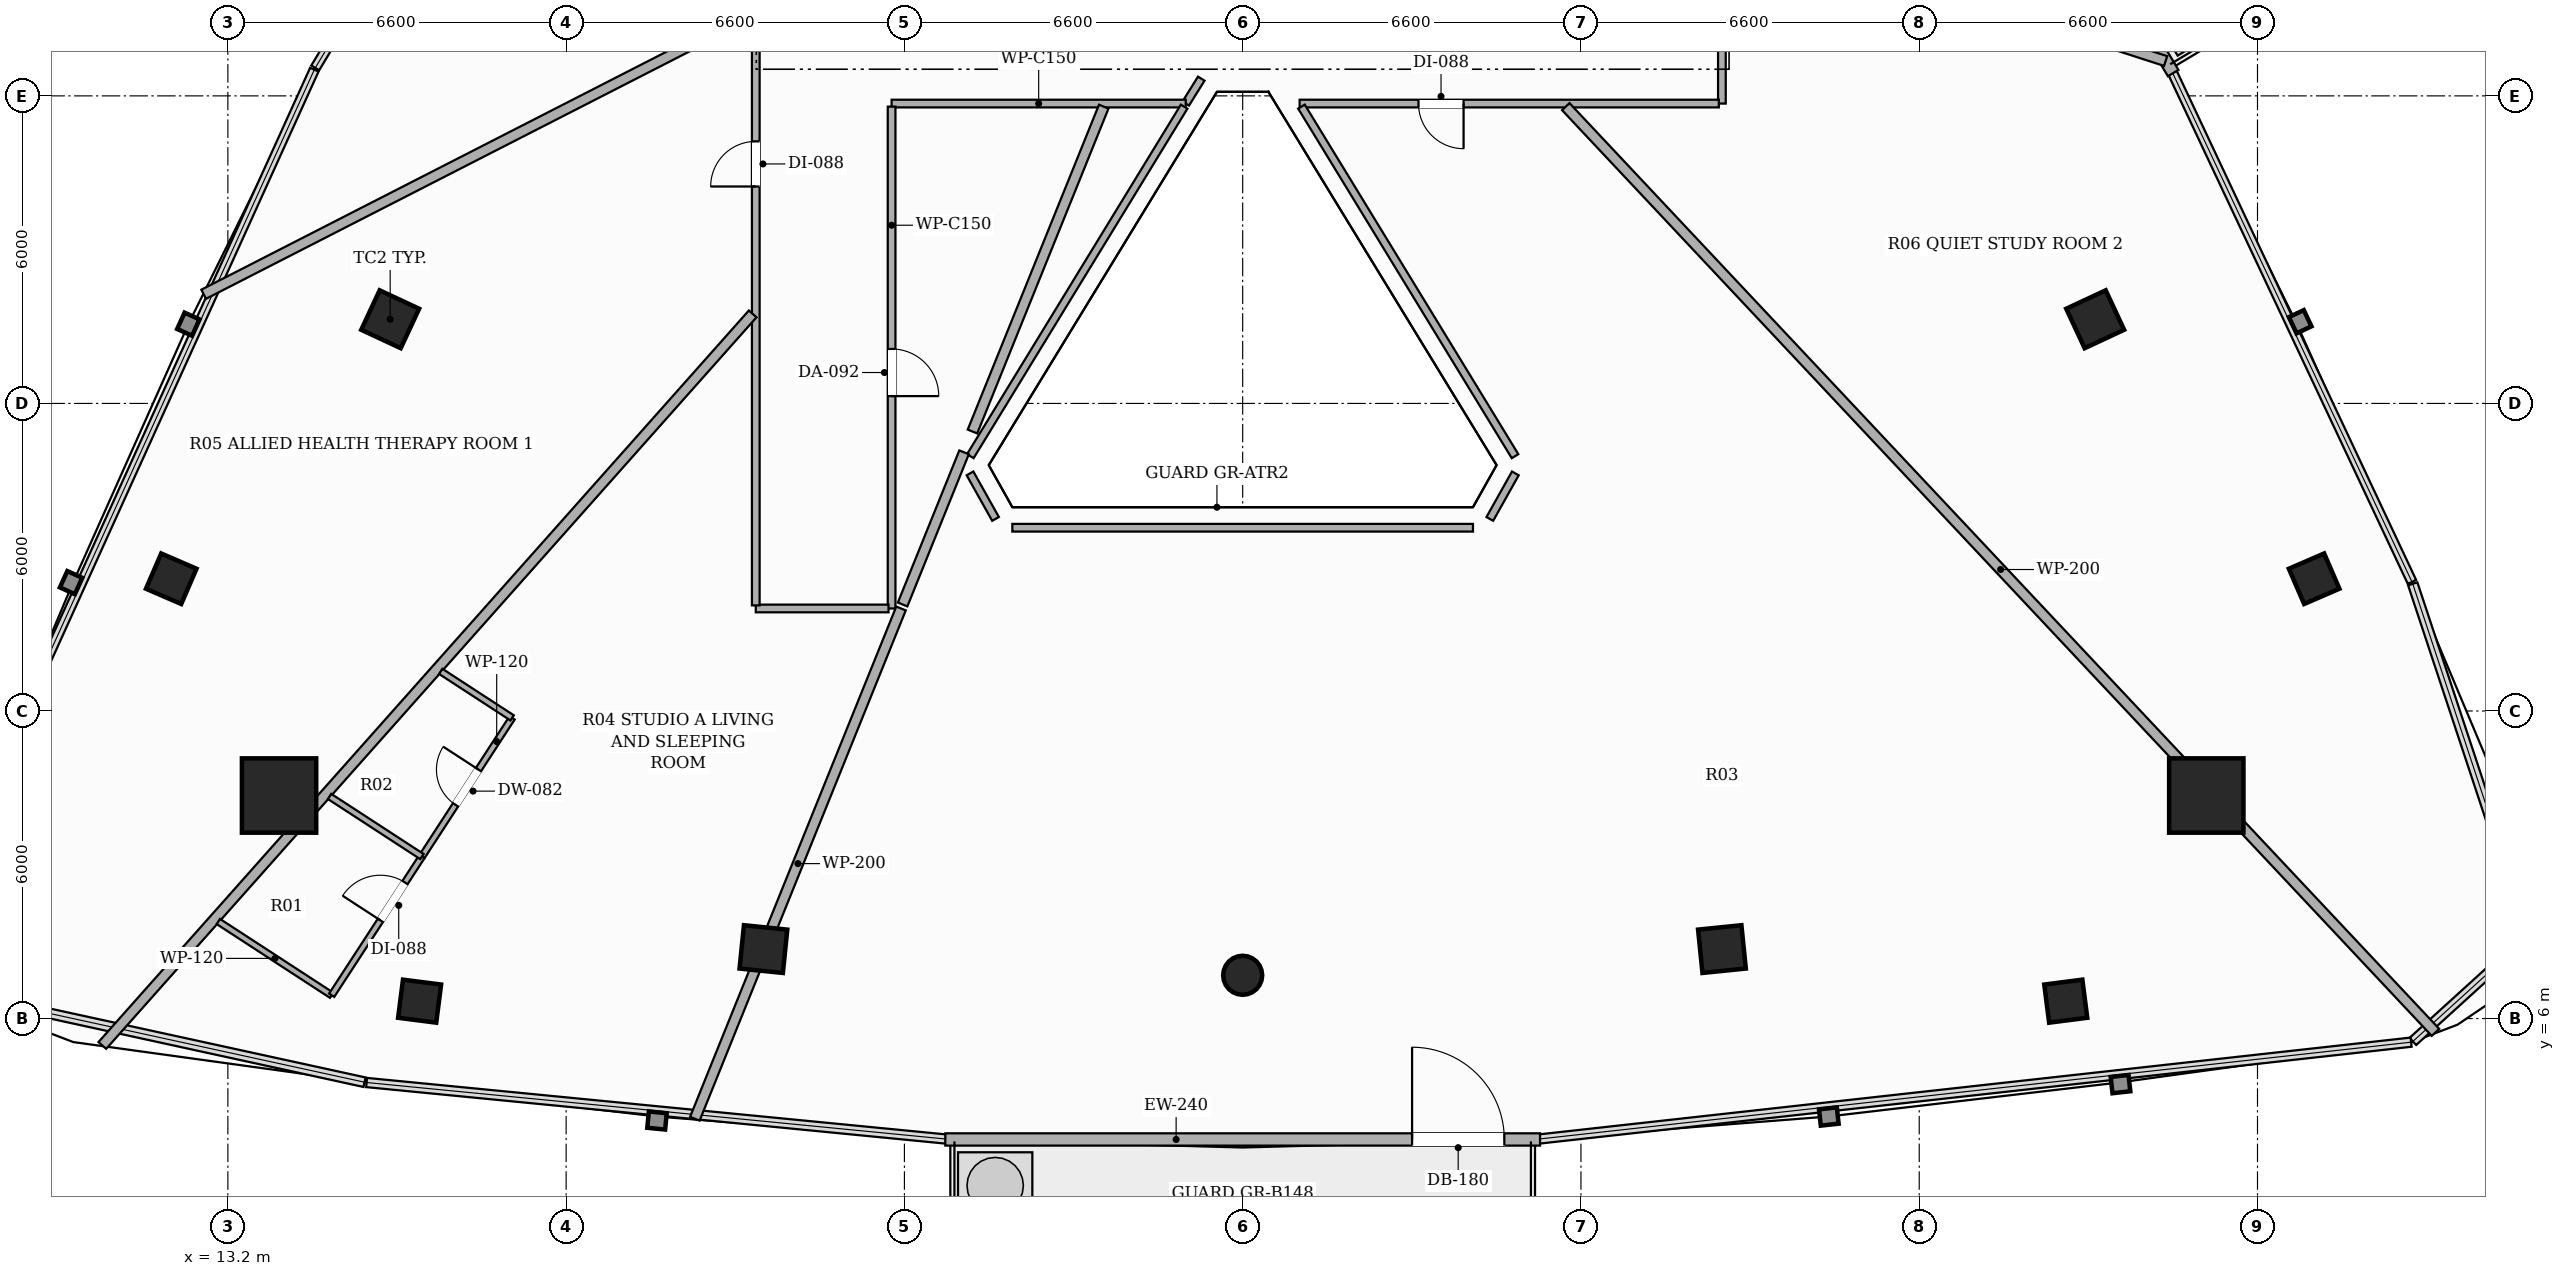
"""IFC4 building model, lengths in metres.
Left out: names, types, materials, properties, quantities, classifications, styles, units other than length and angle.
Written with IfcOpenShell. Run it as: python <this file> out.ifc"""

import sys

from ifc_helpers import new_model, si_unit, direction, frame, frame_2d, origin, origin_2d, place, context, subcontext, project, spatial, rectangle, hollow_rectangle, hollow_circle, extrude, element, fill, save


model = new_model("IFC4")
c1 = context("Model", 3, precision=1e-05, world=origin(), true_north=direction((0.0, 1.0)))
c2 = subcontext(c1, "Body", "Model", "MODEL_VIEW")
j1 = project(units=[si_unit("LENGTHUNIT", "METRE"), si_unit("PLANEANGLEUNIT", "RADIAN")], contexts=[c1])
p1 = place(None, origin())
s1 = spatial("IfcSite", under=j1, at=p1, CompositionType="ELEMENT")
p2 = place(p1, origin())
s2 = spatial("IfcBuilding", under=s1, at=p2, CompositionType="ELEMENT")
p3 = place(p2, frame((0.0, 0.0, 157.25)))
s3 = spatial("IfcBuildingStorey", under=s2, at=p3, CompositionType="ELEMENT", Elevation=157.25)
for number, where, z_axis, x_axis in (
    (1, (14.199, 10.351, 0.0), (0.0, 0.0, 1.0), (1.0, 0.0, 0.0)),
    (2, (51.801, 10.351, 0.0), (0.0, 0.0, 1.0), (1.0, 0.0, 0.0)),
):
    element("IfcColumn", number, at=place(p3, frame(where, z_axis=z_axis, x_axis=x_axis)), inside=s3, PredefinedType="COLUMN", context=c2, shape_type="SweptSolid", body=[
        extrude(hollow_rectangle(XDim=1.45, YDim=1.45, WallThickness=0.045, at=origin_2d()), origin(), (0.0, 0.0, 1.0), 3.3),
    ])
for number, where, z_axis, x_axis in (
    (3, (16.367, 19.642, 0.0), (0.0, 0.0, 1.0), (0.423, 0.906, 0.0)),
    (4, (23.649, 7.355, 0.0), (0.0, 0.0, 1.0), (-0.995, 0.101, 0.0)),
):
    element("IfcColumn", number, at=place(p3, frame(where, z_axis=z_axis, x_axis=x_axis)), inside=s3, PredefinedType="COLUMN", context=c2, shape_type="SweptSolid", body=[
        extrude(hollow_rectangle(XDim=0.85, YDim=0.85, WallThickness=0.028, at=origin_2d()), origin(), (0.0, 0.0, 1.0), 3.3),
    ])
p4 = place(p3, frame((33.0, 6.844, 0.0), z_axis=(0.0, 0.0, 1.0), x_axis=(1.0, 0.0, 0.0)))
e5 = element("IfcColumn", 5, at=p4, inside=s3, PredefinedType="COLUMN", context=c2, shape_type="SweptSolid", body=[
    extrude(hollow_circle(Radius=0.381, WallThickness=0.022, at=origin_2d()), origin(), (0.0, 0.0, 1.0), 3.3),
])
for number, where, z_axis, x_axis in (
    (6, (42.351, 7.355, 0.0), (0.0, 0.0, 1.0), (0.995, 0.101, 0.0)),
    (7, (49.633, 19.642, 0.0), (0.0, 0.0, 1.0), (-0.423, 0.906, 0.0)),
):
    element("IfcColumn", number, at=place(p3, frame(where, z_axis=z_axis, x_axis=x_axis)), inside=s3, PredefinedType="COLUMN", context=c2, shape_type="SweptSolid", body=[
        extrude(hollow_rectangle(XDim=0.85, YDim=0.85, WallThickness=0.028, at=origin_2d()), origin(), (0.0, 0.0, 1.0), 3.3),
    ])
for number, where, z_axis, x_axis in (
    (8, (12.095, 14.58, 0.0), (0.0, 0.0, 1.0), (0.397, 0.918, 0.0)),
    (9, (16.941, 6.339, 0.0), (0.0, 0.0, 1.0), (-0.992, 0.127, 0.0)),
    (10, (49.059, 6.339, 0.0), (0.0, 0.0, 1.0), (0.992, 0.127, 0.0)),
    (11, (53.905, 14.58, 0.0), (0.0, 0.0, 1.0), (-0.397, 0.918, 0.0)),
):
    element("IfcColumn", number, at=place(p3, frame(where, z_axis=z_axis, x_axis=x_axis)), inside=s3, PredefinedType="COLUMN", context=c2, shape_type="SweptSolid", body=[
        extrude(hollow_rectangle(XDim=0.75, YDim=0.75, WallThickness=0.025, at=origin_2d()), origin(), (0.0, 0.0, 1.0), 3.3),
    ])
p5 = place(p3, frame((27.198, 3.641, 0.0), z_axis=(0.0, 0.0, 1.0), x_axis=(1.0, 0.0, 0.0)))
e12 = element("IfcWall", 12, at=p5, inside=s3, PredefinedType="SOLIDWALL", context=c2, shape_type="SweptSolid", body=[
    extrude(rectangle(XDim=11.604, YDim=0.24, at=frame_2d((5.802, 0.0))), origin(), (0.0, 0.0, 1.0), 2.624),
])
p6 = place(p5, frame((9.107, 0.0, 0.0)))
e13 = element("IfcOpeningElement", 13, at=p6, cuts=e12, PredefinedType="OPENING", context=c2, shape_type="SweptSolid", body=[
    extrude(rectangle(XDim=1.8, YDim=2.2, at=frame_2d((0.9, 1.1))), frame((0.0, 0.13, 0.0), z_axis=(0.0, -1.0, 0.0), x_axis=(1.0, 0.0, 0.0)), (0.0, 0.0, 1.0), 0.26),
])
p7 = place(p3, frame((51.155, 24.445, 0.0), z_axis=(0.0, 0.0, 1.0), x_axis=(-0.514335781973, 0.857588889493, 0.0)))
e14 = element("IfcWall", 14, at=p7, inside=s3, PredefinedType="SOLIDWALL", context=c2, shape_type="SweptSolid", body=[
    extrude(rectangle(XDim=11.222, YDim=0.24, at=frame_2d((5.611, 0.0))), origin(), (0.0, 0.0, 1.0), 2.624),
])
p8 = place(p7, frame((8.725, 0.0, 0.0)))
e15 = element("IfcOpeningElement", 15, at=p8, cuts=e14, PredefinedType="OPENING", context=c2, shape_type="SweptSolid", body=[
    extrude(rectangle(XDim=1.8, YDim=2.2, at=frame_2d((0.9, 1.1))), frame((0.0, 0.13, 0.0), z_axis=(0.0, -1.0, 0.0), x_axis=(1.0, 0.0, 0.0)), (0.0, 0.0, 1.0), 0.26),
])
p9 = place(p3, frame((32.192, 24.336, 0.0), z_axis=(0.0, 0.0, 1.0), x_axis=(-0.529155471054, -0.848524889119, 0.0)))
e16 = element("IfcWall", 16, at=p9, inside=s3, PredefinedType="PARTITIONING", context=c2, shape_type="SweptSolid", body=[
    extrude(rectangle(XDim=0.573, YDim=0.15, at=frame_2d((0.286, 0.0))), origin(), (0.0, 0.0, 1.0), 3.06),
])
p10 = place(p3, frame((31.889, 23.85, 0.0), z_axis=(0.0, 0.0, 1.0), x_axis=(-1.0, 0.0, 0.0)))
e17 = element("IfcWall", 17, at=p10, inside=s3, PredefinedType="PARTITIONING", context=c2, shape_type="SweptSolid", body=[
    extrude(rectangle(XDim=5.739, YDim=0.15, at=frame_2d((2.87, 0.0))), origin(), (0.0, 0.0, 1.0), 2.721),
])
p11 = place(p3, frame((26.15, 23.79, 0.0), z_axis=(0.0, 0.0, 1.0), x_axis=(0.0, -1.0, 0.0)))
e18 = element("IfcWall", 18, at=p11, inside=s3, PredefinedType="PARTITIONING", context=c2, shape_type="SweptSolid", body=[
    extrude(rectangle(XDim=9.79, YDim=0.15, at=frame_2d((4.895, 0.0))), origin(), (0.0, 0.0, 1.0), 2.721),
])
p12 = place(p11, frame((4.727, 0.0, 0.0)))
e19 = element("IfcOpeningElement", 19, at=p12, cuts=e18, PredefinedType="OPENING", context=c2, shape_type="SweptSolid", body=[
    extrude(rectangle(XDim=0.92, YDim=2.15, at=frame_2d((0.46, 1.075))), frame((0.0, 0.085, 0.0), z_axis=(0.0, -1.0, 0.0), x_axis=(1.0, 0.0, 0.0)), (0.0, 0.0, 1.0), 0.17),
])
p13 = place(p3, frame((26.09, 14.0, 0.0), z_axis=(0.0, 0.0, 1.0), x_axis=(-1.0, 0.0, 0.0)))
e20 = element("IfcWall", 20, at=p13, inside=s3, PredefinedType="PARTITIONING", context=c2, shape_type="SweptSolid", body=[
    extrude(rectangle(XDim=2.59, YDim=0.15, at=frame_2d((1.295, 0.0))), origin(), (0.0, 0.0, 1.0), 2.721),
])
p14 = place(p3, frame((23.5, 14.06, 0.0), z_axis=(0.0, 0.0, 1.0), x_axis=(0.0, 1.0, 0.0)))
e21 = element("IfcWall", 21, at=p14, inside=s3, PredefinedType="PARTITIONING", context=c2, shape_type="SweptSolid", body=[
    extrude(rectangle(XDim=22.84, YDim=0.15, at=frame_2d((11.42, 0.0))), origin(), (0.0, 0.0, 1.0), 2.413),
])
p15 = place(p14, frame((8.172, 0.0, 0.0)))
e22 = element("IfcOpeningElement", 22, at=p15, cuts=e21, PredefinedType="OPENING", context=c2, shape_type="SweptSolid", body=[
    extrude(rectangle(XDim=0.88, YDim=2.1, at=frame_2d((0.44, 1.05))), frame((0.0, 0.085, 0.0), z_axis=(0.0, -1.0, 0.0), x_axis=(1.0, 0.0, 0.0)), (0.0, 0.0, 1.0), 0.17),
])
p16 = place(p14, frame((20.969, 0.0, 0.0)))
e23 = element("IfcOpeningElement", 23, at=p16, cuts=e21, PredefinedType="OPENING", context=c2, shape_type="SweptSolid", body=[
    extrude(rectangle(XDim=0.88, YDim=2.1, at=frame_2d((0.44, 1.05))), frame((0.0, 0.085, 0.0), z_axis=(0.0, -1.0, 0.0), x_axis=(1.0, 0.0, 0.0)), (0.0, 0.0, 1.0), 0.17),
])
p17 = place(p14, frame((15.484, 0.0, 0.0)))
e24 = element("IfcOpeningElement", 24, at=p17, cuts=e21, PredefinedType="OPENING", context=c2, shape_type="SweptSolid", body=[
    extrude(rectangle(XDim=0.88, YDim=2.1, at=frame_2d((0.44, 1.05))), frame((0.0, 0.085, 0.0), z_axis=(0.0, -1.0, 0.0), x_axis=(1.0, 0.0, 0.0)), (0.0, 0.0, 1.0), 0.17),
])
p18 = place(p3, frame((42.35, 28.34, 0.0), z_axis=(0.0, 0.0, 1.0), x_axis=(0.0, -1.0, 0.0)))
e25 = element("IfcWall", 25, at=p18, inside=s3, PredefinedType="PARTITIONING", context=c2, shape_type="SweptSolid", body=[
    extrude(rectangle(XDim=4.49, YDim=0.15, at=frame_2d((2.245, 0.0))), origin(), (0.0, 0.0, 1.0), 2.721),
])
p19 = place(p18, frame((2.086, 0.0, 0.0)))
e26 = element("IfcOpeningElement", 26, at=p19, cuts=e25, PredefinedType="OPENING", context=c2, shape_type="SweptSolid", body=[
    extrude(rectangle(XDim=0.88, YDim=2.1, at=frame_2d((0.44, 1.05))), frame((0.0, 0.085, 0.0), z_axis=(0.0, -1.0, 0.0), x_axis=(1.0, 0.0, 0.0)), (0.0, 0.0, 1.0), 0.17),
])
p20 = place(p3, frame((42.29, 23.85, 0.0), z_axis=(0.0, 0.0, 1.0), x_axis=(-1.0, 0.0, 0.0)))
e27 = element("IfcWall", 27, at=p20, inside=s3, PredefinedType="PARTITIONING", context=c2, shape_type="SweptSolid", body=[
    extrude(rectangle(XDim=8.179, YDim=0.15, at=frame_2d((4.089, 0.0))), origin(), (0.0, 0.0, 1.0), 2.492),
])
p21 = place(p20, frame((4.98, 0.0, 0.0)))
e28 = element("IfcOpeningElement", 28, at=p21, cuts=e27, PredefinedType="OPENING", context=c2, shape_type="SweptSolid", body=[
    extrude(rectangle(XDim=0.88, YDim=2.1, at=frame_2d((0.44, 1.05))), frame((0.0, 0.085, 0.0), z_axis=(0.0, -1.0, 0.0), x_axis=(1.0, 0.0, 0.0)), (0.0, 0.0, 1.0), 0.17),
])
p22 = place(p3, frame((34.147, 23.79, 0.0), z_axis=(0.0, 0.0, 1.0), x_axis=(0.521429001816, -0.853294671298, 0.0)))
e29 = element("IfcWall", 29, at=p22, inside=s3, PredefinedType="PARTITIONING", context=c2, shape_type="SweptSolid", body=[
    extrude(rectangle(XDim=7.991, YDim=0.15, at=frame_2d((3.996, 0.0))), origin(), (0.0, 0.0, 1.0), 2.721),
])
p23 = place(p3, frame((38.32, 16.635, 0.0), z_axis=(0.0, 0.0, 1.0), x_axis=(-0.489202035948, -0.872170492521, 0.0)))
e30 = element("IfcWall", 30, at=p23, inside=s3, PredefinedType="PARTITIONING", context=c2, shape_type="SweptSolid", body=[
    extrude(rectangle(XDim=1.018, YDim=0.15, at=frame_2d((0.509, 0.0))), origin(), (0.0, 0.0, 1.0), 3.06),
])
p24 = place(p3, frame((37.493, 15.575, 0.0), z_axis=(0.0, 0.0, 1.0), x_axis=(-1.0, 0.0, 0.0)))
e31 = element("IfcWall", 31, at=p24, inside=s3, PredefinedType="PARTITIONING", context=c2, shape_type="SweptSolid", body=[
    extrude(rectangle(XDim=8.987, YDim=0.15, at=frame_2d((4.493, 0.0))), origin(), (0.0, 0.0, 1.0), 2.721),
])
p25 = place(p3, frame((28.178, 15.747, 0.0), z_axis=(0.0, 0.0, 1.0), x_axis=(-0.489202035948, 0.872170492521, 0.0)))
e32 = element("IfcWall", 32, at=p25, inside=s3, PredefinedType="PARTITIONING", context=c2, shape_type="SweptSolid", body=[
    extrude(rectangle(XDim=1.018, YDim=0.15, at=frame_2d((0.509, 0.0))), origin(), (0.0, 0.0, 1.0), 3.06),
])
p26 = place(p3, frame((27.686, 16.971, 0.0), z_axis=(0.0, 0.0, 1.0), x_axis=(0.521873666917, 0.853022787374, 0.0)))
e33 = element("IfcWall", 33, at=p26, inside=s3, PredefinedType="PARTITIONING", context=c2, shape_type="SweptSolid", body=[
    extrude(rectangle(XDim=7.994, YDim=0.15, at=frame_2d((3.997, 0.0))), origin(), (0.0, 0.0, 1.0), 2.721),
])
p27 = place(p3, frame((39.304, 23.79, 0.0), z_axis=(0.0, 0.0, 1.0), x_axis=(0.684750154022, -0.72877789934, 0.0)))
e34 = element("IfcWall", 34, at=p27, inside=s3, PredefinedType="PARTITIONING", context=c2, shape_type="SweptSolid", body=[
    extrude(rectangle(XDim=24.781, YDim=0.2, at=frame_2d((12.391, 0.0))), origin(), (0.0, 0.0, 1.0), 2.413),
])
p28 = place(p3, frame((22.311, 4.045, 0.0), z_axis=(0.0, 0.0, 1.0), x_axis=(0.374673572515, 0.92715679044, 0.0)))
e35 = element("IfcWall", 35, at=p28, inside=s3, PredefinedType="PARTITIONING", context=c2, shape_type="SweptSolid", body=[
    extrude(rectangle(XDim=10.737, YDim=0.2, at=frame_2d((5.369, 0.0))), origin(), (0.0, 0.0, 1.0), 2.413),
])
p29 = place(p3, frame((26.365, 14.078, 0.0), z_axis=(0.0, 0.0, 1.0), x_axis=(0.374557626207, 0.927203637099, 0.0)))
e36 = element("IfcWall", 36, at=p29, inside=s3, PredefinedType="PARTITIONING", context=c2, shape_type="SweptSolid", body=[
    extrude(rectangle(XDim=3.201, YDim=0.2, at=frame_2d((1.601, 0.0))), origin(), (0.0, 0.0, 1.0), 3.06),
])
p30 = place(p3, frame((27.728, 17.452, 0.0), z_axis=(0.0, 0.0, 1.0), x_axis=(0.374639602714, 0.927170517261, 0.0)))
e37 = element("IfcWall", 37, at=p30, inside=s3, PredefinedType="PARTITIONING", context=c2, shape_type="SweptSolid", body=[
    extrude(rectangle(XDim=6.836, YDim=0.2, at=frame_2d((3.418, 0.0))), origin(), (0.0, 0.0, 1.0), 2.721),
])
p31 = place(p3, frame((42.41, 27.459, 0.0), z_axis=(0.0, 0.0, 1.0), x_axis=(0.951531988225, -0.307549793343, 0.0)))
e38 = element("IfcWall", 38, at=p31, inside=s3, PredefinedType="PARTITIONING", context=c2, shape_type="SweptSolid", body=[
    extrude(rectangle(XDim=9.036, YDim=0.2, at=frame_2d((4.518, 0.0))), origin(), (0.0, 0.0, 1.0), 2.413),
])
p32 = place(p3, frame((23.44, 19.747, 0.0), z_axis=(0.0, 0.0, 1.0), x_axis=(-0.664444771995, -0.747337370248, 0.0)))
e39 = element("IfcWall", 39, at=p32, inside=s3, PredefinedType="PARTITIONING", context=c2, shape_type="SweptSolid", body=[
    extrude(rectangle(XDim=19.097, YDim=0.2, at=frame_2d((9.549, 0.0))), origin(), (0.0, 0.0, 1.0), 2.413),
])
p33 = place(p3, frame((12.728, 20.13, 0.0), z_axis=(0.0, 0.0, 1.0), x_axis=(0.890257920911, 0.455456731486, 0.0)))
e40 = element("IfcWall", 40, at=p33, inside=s3, PredefinedType="PARTITIONING", context=c2, shape_type="SweptSolid", body=[
    extrude(rectangle(XDim=12.032, YDim=0.2, at=frame_2d((6.016, 0.0))), origin(), (0.0, 0.0, 1.0), 2.413),
])
p34 = place(p3, frame((16.986, 9.16, 0.0), z_axis=(0.0, 0.0, 1.0), x_axis=(0.545222266406, 0.8382915246, 0.0)))
e41 = element("IfcWall", 41, at=p34, inside=s3, PredefinedType="PARTITIONING", context=c2, shape_type="SweptSolid", body=[
    extrude(rectangle(XDim=3.228, YDim=0.12, at=frame_2d((1.614, 0.0))), origin(), (0.0, 0.0, 1.0), 3.06),
])
p35 = place(p34, frame((1.204, 0.0, 0.0)))
e42 = element("IfcOpeningElement", 42, at=p35, cuts=e41, PredefinedType="OPENING", context=c2, shape_type="SweptSolid", body=[
    extrude(rectangle(XDim=0.82, YDim=2.1, at=frame_2d((0.41, 1.05))), frame((0.0, 0.07, 0.0), z_axis=(0.0, -1.0, 0.0), x_axis=(1.0, 0.0, 0.0)), (0.0, 0.0, 1.0), 0.14),
])
p36 = place(p3, frame((18.746, 11.866, 0.0), z_axis=(0.0, 0.0, 1.0), x_axis=(-0.838034005253, 0.545618003771, 0.0)))
e43 = element("IfcWall", 43, at=p36, inside=s3, PredefinedType="PARTITIONING", context=c2, shape_type="SweptSolid", body=[
    extrude(rectangle(XDim=1.662, YDim=0.12, at=frame_2d((0.831, 0.0))), origin(), (0.0, 0.0, 1.0), 3.06),
])
p37 = place(p3, frame((13.014, 7.893, 0.0), z_axis=(0.0, 0.0, 1.0), x_axis=(0.838149605573, -0.545440407999, 0.0)))
e44 = element("IfcWall", 44, at=p37, inside=s3, PredefinedType="PARTITIONING", context=c2, shape_type="SweptSolid", body=[
    extrude(rectangle(XDim=2.638, YDim=0.12, at=frame_2d((1.319, 0.0))), origin(), (0.0, 0.0, 1.0), 3.06),
])
p38 = place(p3, frame((15.225, 6.454, 0.0), z_axis=(0.0, 0.0, 1.0), x_axis=(0.54546937792, 0.838130752181, 0.0)))
e45 = element("IfcWall", 45, at=p38, inside=s3, PredefinedType="PARTITIONING", context=c2, shape_type="SweptSolid", body=[
    extrude(rectangle(XDim=3.228, YDim=0.12, at=frame_2d((1.614, 0.0))), origin(), (0.0, 0.0, 1.0), 2.413),
])
p39 = place(p38, frame((1.744, 0.0, 0.0)))
e46 = element("IfcOpeningElement", 46, at=p39, cuts=e45, PredefinedType="OPENING", context=c2, shape_type="SweptSolid", body=[
    extrude(rectangle(XDim=0.88, YDim=2.1, at=frame_2d((0.44, 1.05))), frame((0.0, 0.07, 0.0), z_axis=(0.0, -1.0, 0.0), x_axis=(1.0, 0.0, 0.0)), (0.0, 0.0, 1.0), 0.14),
])
p40 = place(p3, frame((16.986, 9.16, 0.0), z_axis=(0.0, 0.0, 1.0), x_axis=(-0.838062073647, 0.545574890106, 0.0)))
e47 = element("IfcWall", 47, at=p40, inside=s3, PredefinedType="PARTITIONING", context=c2, shape_type="SweptSolid", body=[
    extrude(rectangle(XDim=2.15, YDim=0.12, at=frame_2d((1.075, 0.0))), origin(), (0.0, 0.0, 1.0), 3.06),
])
p41 = place(p6, origin())
e48 = element("IfcDoor", 48, at=p41, inside=s3, OperationType="SINGLE_SWING_LEFT", PredefinedType="DOOR", context=c2, shape_type="SweptSolid", body=[
    extrude(rectangle(XDim=1.8, YDim=2.2, at=frame_2d((0.9, 1.1))), frame((0.0, 0.025, 0.0), z_axis=(0.0, -1.0, 0.0), x_axis=(1.0, 0.0, 0.0)), (0.0, 0.0, 1.0), 0.05),
])
fill(e13, e48)
p42 = place(p21, origin())
e49 = element("IfcDoor", 49, at=p42, inside=s3, OperationType="SINGLE_SWING_LEFT", PredefinedType="DOOR", context=c2, shape_type="SweptSolid", body=[
    extrude(rectangle(XDim=0.88, YDim=2.1, at=frame_2d((0.44, 1.05))), frame((0.0, 0.025, 0.0), z_axis=(0.0, -1.0, 0.0), x_axis=(1.0, 0.0, 0.0)), (0.0, 0.0, 1.0), 0.05),
])
fill(e28, e49)
p43 = place(p15, origin())
e50 = element("IfcDoor", 50, at=p43, inside=s3, OperationType="SINGLE_SWING_LEFT", PredefinedType="DOOR", context=c2, shape_type="SweptSolid", body=[
    extrude(rectangle(XDim=0.88, YDim=2.1, at=frame_2d((0.44, 1.05))), frame((0.0, 0.025, 0.0), z_axis=(0.0, -1.0, 0.0), x_axis=(1.0, 0.0, 0.0)), (0.0, 0.0, 1.0), 0.05),
])
fill(e22, e50)
p44 = place(p12, origin())
e51 = element("IfcDoor", 51, at=p44, inside=s3, OperationType="SINGLE_SWING_RIGHT", PredefinedType="DOOR", context=c2, shape_type="SweptSolid", body=[
    extrude(rectangle(XDim=0.92, YDim=2.15, at=frame_2d((0.46, 1.075))), frame((0.0, 0.025, 0.0), z_axis=(0.0, -1.0, 0.0), x_axis=(1.0, 0.0, 0.0)), (0.0, 0.0, 1.0), 0.05),
])
fill(e19, e51)
p45 = place(p35, origin())
e52 = element("IfcDoor", 52, at=p45, inside=s3, OperationType="SINGLE_SWING_RIGHT", PredefinedType="DOOR", context=c2, shape_type="SweptSolid", body=[
    extrude(rectangle(XDim=0.82, YDim=2.1, at=frame_2d((0.41, 1.05))), frame((0.0, 0.025, 0.0), z_axis=(0.0, -1.0, 0.0), x_axis=(1.0, 0.0, 0.0)), (0.0, 0.0, 1.0), 0.05),
])
fill(e42, e52)
p46 = place(p39, origin())
e53 = element("IfcDoor", 53, at=p46, inside=s3, OperationType="SINGLE_SWING_LEFT", PredefinedType="DOOR", context=c2, shape_type="SweptSolid", body=[
    extrude(rectangle(XDim=0.88, YDim=2.1, at=frame_2d((0.44, 1.05))), frame((0.0, 0.025, 0.0), z_axis=(0.0, -1.0, 0.0), x_axis=(1.0, 0.0, 0.0)), (0.0, 0.0, 1.0), 0.05),
])
fill(e46, e53)
save(model, sys.argv[1])
